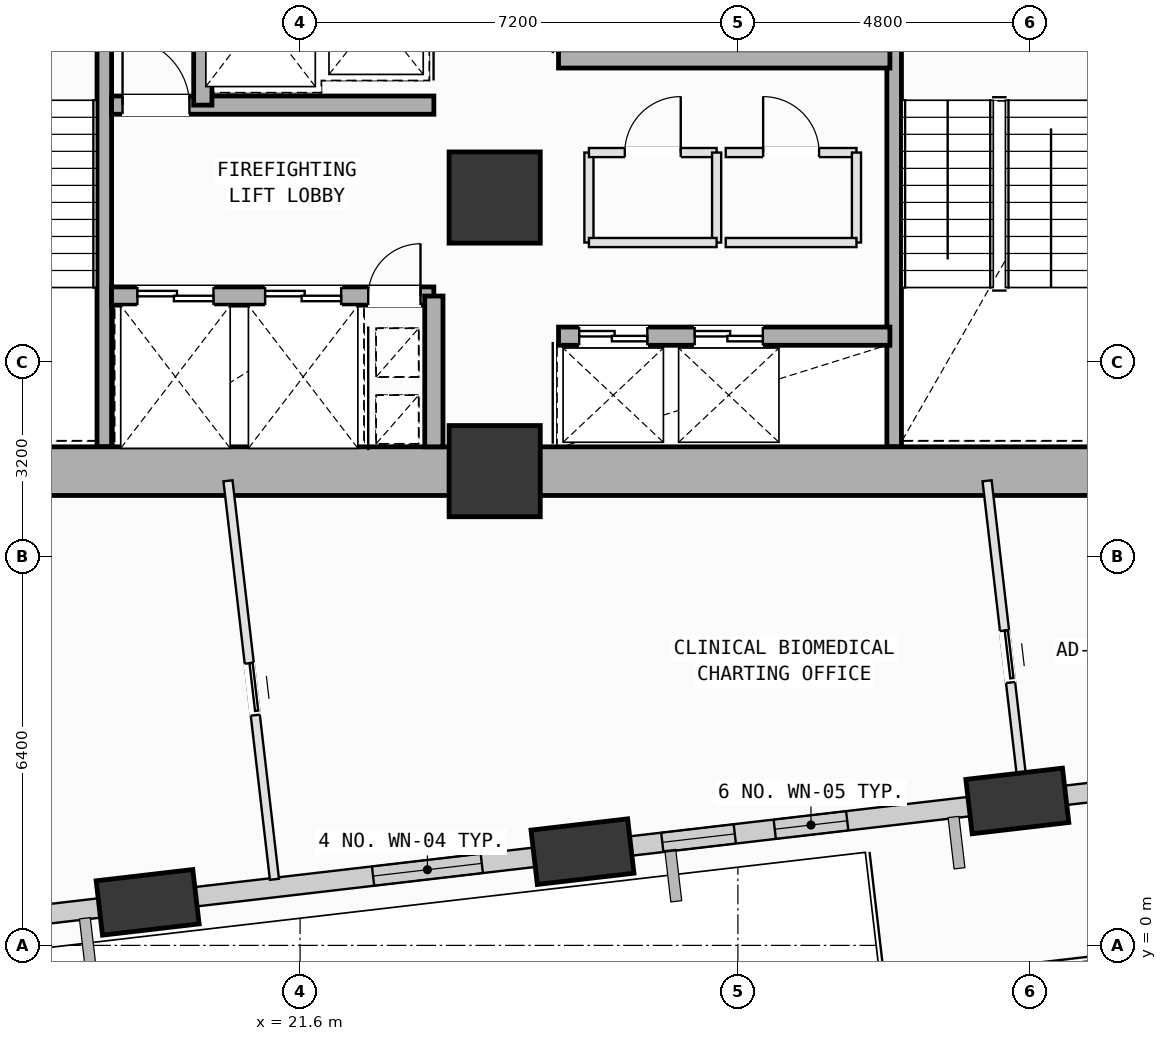
"""IFC4 building model, lengths in metres.
Left out: names, types, materials, properties, quantities, classifications, styles, units other than length and angle.
Written with IfcOpenShell. Run it as: python <this file> out.ifc"""

import sys

from ifc_helpers import new_model, si_unit, direction, frame, frame_2d, origin, origin_2d, place, context, subcontext, project, spatial, rectangle, extrude, element, fill, save


model = new_model("IFC4")
c1 = context("Model", 3, precision=1e-05, world=origin(), true_north=direction((0.0, 1.0)))
c2 = subcontext(c1, "Body", "Model", "MODEL_VIEW")
j1 = project(units=[si_unit("LENGTHUNIT", "METRE"), si_unit("PLANEANGLEUNIT", "RADIAN")], contexts=[c1])
p1 = place(None, origin())
s1 = spatial("IfcSite", under=j1, at=p1, CompositionType="ELEMENT")
p2 = place(p1, origin())
s2 = spatial("IfcBuilding", under=s1, at=p2, CompositionType="ELEMENT")
p3 = place(p2, frame((0.0, 0.0, 51.0)))
s3 = spatial("IfcBuildingStorey", under=s2, at=p3, CompositionType="ELEMENT", Elevation=51.0)
for number, where, z_axis, x_axis in (
    (1, (24.8, 7.8, 0.0), (0.0, 0.0, 1.0), (1.0, 0.0, 0.0)),
    (2, (24.8, 12.3, 0.0), (0.0, 0.0, 1.0), (1.0, 0.0, 0.0)),
):
    element("IfcColumn", number, at=place(p3, frame(where, z_axis=z_axis, x_axis=x_axis)), inside=s3, PredefinedType="COLUMN", context=c2, shape_type="SweptSolid", body=[
        extrude(rectangle(XDim=1.5, YDim=1.5, at=origin_2d()), origin(), (0.0, 0.0, 1.0), 4.0),
    ])
p4 = place(p3, frame((19.093, 0.708, 0.002), z_axis=(0.099691318182, -0.058916780252, 0.993272598074), x_axis=(0.406334815095, 0.913625847091, 0.013410054754)))
e3 = element("IfcColumn", 3, at=p4, inside=s3, PredefinedType="COLUMN", context=c2, shape_type="SweptSolid", body=[
    extrude(rectangle(XDim=1.6, YDim=0.9, at=origin_2d()), origin(), (0.0, 0.0, 1.0), 4.024),
])
p5 = place(p3, frame((26.244, 1.542, 0.002), z_axis=(0.096150082525, -0.029537888816, 0.994928477206), x_axis=(0.181548759309, 0.983312955757, 0.011648134348)))
e4 = element("IfcColumn", 4, at=p5, inside=s3, PredefinedType="COLUMN", context=c2, shape_type="SweptSolid", body=[
    extrude(rectangle(XDim=1.6, YDim=0.9, at=origin_2d()), origin(), (0.0, 0.0, 1.0), 4.017),
])
p6 = place(p3, frame((33.396, 2.375, 0.002), z_axis=(0.092515382804, -6.0825367e-05, 0.995711253449), x_axis=(-0.114654270311, 0.993347681302, 0.010713652585)))
e5 = element("IfcColumn", 5, at=p6, inside=s3, PredefinedType="COLUMN", context=c2, shape_type="SweptSolid", body=[
    extrude(rectangle(XDim=1.6, YDim=0.9, at=origin_2d()), origin(), (0.0, 0.0, 1.0), 4.014),
])
p7 = place(p3, frame((18.689, 0.661, 0.0), z_axis=(0.0, 0.0, 1.0), x_axis=(-0.99327376763, -0.115789561442, 0.0)))
e6 = element("IfcWall", 6, at=p7, inside=s3, PredefinedType="SOLIDWALL", context=c2, shape_type="SweptSolid", body=[
    extrude(rectangle(XDim=6.034, YDim=0.32, at=frame_2d((3.017, 0.0))), origin(), (0.0, 0.0, 1.0), 3.165),
])
p8 = place(p7, frame((2.313, 0.0, 0.75)))
e7 = element("IfcOpeningElement", 7, at=p8, cuts=e6, PredefinedType="OPENING", context=c2, shape_type="SweptSolid", body=[
    extrude(rectangle(XDim=1.4, YDim=1.85, at=frame_2d((0.7, 0.925))), frame((0.0, 0.17, 0.0), z_axis=(0.0, -1.0, 0.0), x_axis=(1.0, 0.0, 0.0)), (0.0, 0.0, 1.0), 0.34),
])
p9 = place(p3, frame((25.83, 1.493, 0.0), z_axis=(0.0, 0.0, 1.0), x_axis=(-0.993271324442, -0.115810517836, 0.0)))
e8 = element("IfcWall", 8, at=p9, inside=s3, PredefinedType="SOLIDWALL", context=c2, shape_type="SweptSolid", body=[
    extrude(rectangle(XDim=6.006, YDim=0.32, at=frame_2d((3.003, 0.0))), origin(), (0.0, 0.0, 1.0), 3.165),
])
p10 = place(p9, frame((1.25, 0.0, 0.75)))
e9 = element("IfcOpeningElement", 9, at=p10, cuts=e8, PredefinedType="OPENING", context=c2, shape_type="SweptSolid", body=[
    extrude(rectangle(XDim=1.8, YDim=2.05, at=frame_2d((0.9, 1.025))), frame((0.0, 0.17, 0.0), z_axis=(0.0, -1.0, 0.0), x_axis=(1.0, 0.0, 0.0)), (0.0, 0.0, 1.0), 0.34),
])
p11 = place(p3, frame((32.976, 2.326, 0.0), z_axis=(0.0, 0.0, 1.0), x_axis=(-0.99327275312, -0.115798263844, 0.0)))
e10 = element("IfcWall", 10, at=p11, inside=s3, PredefinedType="SOLIDWALL", context=c2, shape_type="SweptSolid", body=[
    extrude(rectangle(XDim=5.99, YDim=0.32, at=frame_2d((2.995, 0.0))), origin(), (0.0, 0.0, 1.0), 3.165),
])
p12 = place(p11, frame((2.394, 0.0, 0.75)))
e11 = element("IfcOpeningElement", 11, at=p12, cuts=e10, PredefinedType="OPENING", context=c2, shape_type="SweptSolid", body=[
    extrude(rectangle(XDim=1.2, YDim=1.75, at=frame_2d((0.6, 0.875))), frame((0.0, 0.17, 0.0), z_axis=(0.0, -1.0, 0.0), x_axis=(1.0, 0.0, 0.0)), (0.0, 0.0, 1.0), 0.34),
])
p13 = place(p11, frame((4.256, 0.0, 0.75)))
e12 = element("IfcOpeningElement", 12, at=p13, cuts=e10, PredefinedType="OPENING", context=c2, shape_type="SweptSolid", body=[
    extrude(rectangle(XDim=1.2, YDim=1.75, at=frame_2d((0.6, 0.875))), frame((0.0, 0.17, 0.0), z_axis=(0.0, -1.0, 0.0), x_axis=(1.0, 0.0, 0.0)), (0.0, 0.0, 1.0), 0.34),
])
p14 = place(p3, frame((38.599, 2.982, 0.0), z_axis=(0.0, 0.0, 1.0), x_axis=(-0.993273351727, -0.115793129113, 0.0)))
e13 = element("IfcWall", 13, at=p14, inside=s3, PredefinedType="SOLIDWALL", context=c2, shape_type="SweptSolid", body=[
    extrude(rectangle(XDim=4.447, YDim=0.32, at=frame_2d((2.223, 0.0))), origin(), (0.0, 0.0, 1.0), 3.165),
])
p15 = place(p14, frame((1.348, 0.0, 0.75)))
e14 = element("IfcOpeningElement", 14, at=p15, cuts=e13, PredefinedType="OPENING", context=c2, shape_type="SweptSolid", body=[
    extrude(rectangle(XDim=1.6, YDim=1.95, at=frame_2d((0.8, 0.975))), frame((0.0, 0.17, 0.0), z_axis=(0.0, -1.0, 0.0), x_axis=(1.0, 0.0, 0.0)), (0.0, 0.0, 1.0), 0.34),
])
for number, where, z_axis, x_axis in (
    (15, (18.38, 15.12, 0.0), (0.0, 0.0, 1.0), (0.0, -1.0, 0.0)),
    (16, (31.37, 8.2, 0.0), (0.0, 0.0, 1.0), (0.0, 1.0, 0.0)),
):
    element("IfcWall", number, at=place(p3, frame(where, z_axis=z_axis, x_axis=x_axis)), inside=s3, PredefinedType="SOLIDWALL", context=c2, shape_type="SweptSolid", body=[
        extrude(rectangle(XDim=6.92, YDim=0.24, at=frame_2d((3.46, 0.0))), origin(), (0.0, 0.0, 1.0), 3.78),
    ])
for number, where, z_axis, x_axis in (
    (17, (14.0, 7.8, 0.0), (0.0, 0.0, 1.0), (1.0, 0.0, 0.0)),
    (18, (24.8, 7.8, 0.0), (0.0, 0.0, 1.0), (1.0, 0.0, 0.0)),
):
    element("IfcWall", number, at=place(p3, frame(where, z_axis=z_axis, x_axis=x_axis)), inside=s3, PredefinedType="SHEAR", context=c2, shape_type="SweptSolid", body=[
        extrude(rectangle(XDim=10.8, YDim=0.8, at=frame_2d((5.4, 0.0))), origin(), (0.0, 0.0, 1.0), 3.78),
    ])
p16 = place(p3, frame((18.5, 10.68, 0.0), z_axis=(0.0, 0.0, 1.0), x_axis=(1.0, 0.0, 0.0)))
e19 = element("IfcWall", 19, at=p16, inside=s3, PredefinedType="SOLIDWALL", context=c2, shape_type="SweptSolid", body=[
    extrude(rectangle(XDim=5.3, YDim=0.3, at=frame_2d((2.65, 0.0))), origin(), (0.0, 0.0, 1.0), 3.78),
])
p17 = place(p16, frame((4.22, 0.0, 0.0)))
e20 = element("IfcOpeningElement", 20, at=p17, cuts=e19, PredefinedType="OPENING", context=c2, shape_type="SweptSolid", body=[
    extrude(rectangle(XDim=0.86, YDim=2.06, at=frame_2d((0.43, 1.03))), frame((0.0, 0.16, 0.0), z_axis=(0.0, -1.0, 0.0), x_axis=(1.0, 0.0, 0.0)), (0.0, 0.0, 1.0), 0.32),
])
p18 = place(p16, frame((0.425, 0.0, 0.0)))
e21 = element("IfcOpeningElement", 21, at=p18, cuts=e19, PredefinedType="OPENING", context=c2, shape_type="SweptSolid", body=[
    extrude(rectangle(XDim=1.25, YDim=2.18, at=frame_2d((0.625, 1.09))), frame((0.0, 0.16, 0.0), z_axis=(0.0, -1.0, 0.0), x_axis=(1.0, 0.0, 0.0)), (0.0, 0.0, 1.0), 0.32),
])
p19 = place(p16, frame((2.525, 0.0, 0.0)))
e22 = element("IfcOpeningElement", 22, at=p19, cuts=e19, PredefinedType="OPENING", context=c2, shape_type="SweptSolid", body=[
    extrude(rectangle(XDim=1.25, YDim=2.18, at=frame_2d((0.625, 1.09))), frame((0.0, 0.16, 0.0), z_axis=(0.0, -1.0, 0.0), x_axis=(1.0, 0.0, 0.0)), (0.0, 0.0, 1.0), 0.32),
])
p20 = place(p3, frame((18.5, 13.82, 0.0), z_axis=(0.0, 0.0, 1.0), x_axis=(1.0, 0.0, 0.0)))
e23 = element("IfcWall", 23, at=p20, inside=s3, PredefinedType="SOLIDWALL", context=c2, shape_type="SweptSolid", body=[
    extrude(rectangle(XDim=5.3, YDim=0.3, at=frame_2d((2.65, 0.0))), origin(), (0.0, 0.0, 1.0), 3.78),
])
p21 = place(p20, frame((0.18, 0.0, 0.0)))
e24 = element("IfcOpeningElement", 24, at=p21, cuts=e23, PredefinedType="OPENING", context=c2, shape_type="SweptSolid", body=[
    extrude(rectangle(XDim=1.1, YDim=2.15, at=frame_2d((0.55, 1.075))), frame((0.0, 0.16, 0.0), z_axis=(0.0, -1.0, 0.0), x_axis=(1.0, 0.0, 0.0)), (0.0, 0.0, 1.0), 0.32),
])
p22 = place(p3, frame((23.8, 8.2, 0.0), z_axis=(0.0, 0.0, 1.0), x_axis=(0.0, 1.0, 0.0)))
e25 = element("IfcWall", 25, at=p22, inside=s3, PredefinedType="SOLIDWALL", context=c2, shape_type="SweptSolid", body=[
    extrude(rectangle(XDim=2.48, YDim=0.3, at=frame_2d((1.24, 0.0))), origin(), (0.0, 0.0, 1.0), 3.78),
])
p23 = place(p3, frame((20.0, 13.82, 0.0), z_axis=(0.0, 0.0, 1.0), x_axis=(0.0, 1.0, 0.0)))
e26 = element("IfcWall", 26, at=p23, inside=s3, PredefinedType="SOLIDWALL", context=c2, shape_type="SweptSolid", body=[
    extrude(rectangle(XDim=2.73, YDim=0.3, at=frame_2d((1.365, 0.0))), origin(), (0.0, 0.0, 1.0), 3.78),
])
p24 = place(p3, frame((25.85, 10.02, 0.0), z_axis=(0.0, 0.0, 1.0), x_axis=(1.0, 0.0, 0.0)))
e27 = element("IfcWall", 27, at=p24, inside=s3, PredefinedType="SOLIDWALL", context=c2, shape_type="SweptSolid", body=[
    extrude(rectangle(XDim=5.45, YDim=0.3, at=frame_2d((2.725, 0.0))), origin(), (0.0, 0.0, 1.0), 3.78),
])
p25 = place(p24, frame((0.34, 0.0, 0.0)))
e28 = element("IfcOpeningElement", 28, at=p25, cuts=e27, PredefinedType="OPENING", context=c2, shape_type="SweptSolid", body=[
    extrude(rectangle(XDim=1.12, YDim=2.15, at=frame_2d((0.56, 1.075))), frame((0.0, 0.16, 0.0), z_axis=(0.0, -1.0, 0.0), x_axis=(1.0, 0.0, 0.0)), (0.0, 0.0, 1.0), 0.32),
])
p26 = place(p24, frame((2.24, 0.0, 0.0)))
e29 = element("IfcOpeningElement", 29, at=p26, cuts=e27, PredefinedType="OPENING", context=c2, shape_type="SweptSolid", body=[
    extrude(rectangle(XDim=1.12, YDim=2.15, at=frame_2d((0.56, 1.075))), frame((0.0, 0.16, 0.0), z_axis=(0.0, -1.0, 0.0), x_axis=(1.0, 0.0, 0.0)), (0.0, 0.0, 1.0), 0.32),
])
p27 = place(p3, frame((25.85, 14.58, 0.0), z_axis=(0.0, 0.0, 1.0), x_axis=(1.0, 0.0, 0.0)))
e30 = element("IfcWall", 30, at=p27, inside=s3, PredefinedType="SOLIDWALL", context=c2, shape_type="SweptSolid", body=[
    extrude(rectangle(XDim=5.45, YDim=0.3, at=frame_2d((2.725, 0.0))), origin(), (0.0, 0.0, 1.0), 3.78),
])
p28 = place(p3, frame((26.35, 11.56, 0.0), z_axis=(0.0, 0.0, 1.0), x_axis=(0.0, 1.0, 0.0)))
e31 = element("IfcWall", 31, at=p28, inside=s3, PredefinedType="PARTITIONING", context=c2, shape_type="SweptSolid", body=[
    extrude(rectangle(XDim=1.48, YDim=0.15, at=frame_2d((0.74, 0.0))), origin(), (0.0, 0.0, 1.0), 3.78),
])
p29 = place(p3, frame((26.35, 13.04, 0.0), z_axis=(0.0, 0.0, 1.0), x_axis=(1.0, 0.0, 0.0)))
e32 = element("IfcWall", 32, at=p29, inside=s3, PredefinedType="PARTITIONING", context=c2, shape_type="SweptSolid", body=[
    extrude(rectangle(XDim=2.1, YDim=0.15, at=frame_2d((1.05, 0.0))), origin(), (0.0, 0.0, 1.0), 3.78),
])
p30 = place(p29, frame((0.59, 0.0, 0.0)))
e33 = element("IfcOpeningElement", 33, at=p30, cuts=e32, PredefinedType="OPENING", context=c2, shape_type="SweptSolid", body=[
    extrude(rectangle(XDim=0.92, YDim=2.1, at=frame_2d((0.46, 1.05))), frame((0.0, 0.085, 0.0), z_axis=(0.0, -1.0, 0.0), x_axis=(1.0, 0.0, 0.0)), (0.0, 0.0, 1.0), 0.17),
])
p31 = place(p3, frame((28.45, 13.04, 0.0), z_axis=(0.0, 0.0, 1.0), x_axis=(0.0, -1.0, 0.0)))
e34 = element("IfcWall", 34, at=p31, inside=s3, PredefinedType="PARTITIONING", context=c2, shape_type="SweptSolid", body=[
    extrude(rectangle(XDim=1.48, YDim=0.15, at=frame_2d((0.74, 0.0))), origin(), (0.0, 0.0, 1.0), 3.78),
])
p32 = place(p3, frame((28.45, 11.56, 0.0), z_axis=(0.0, 0.0, 1.0), x_axis=(-1.0, 0.0, 0.0)))
e35 = element("IfcWall", 35, at=p32, inside=s3, PredefinedType="PARTITIONING", context=c2, shape_type="SweptSolid", body=[
    extrude(rectangle(XDim=2.1, YDim=0.15, at=frame_2d((1.05, 0.0))), origin(), (0.0, 0.0, 1.0), 3.78),
])
p33 = place(p3, frame((28.6, 13.04, 0.0), z_axis=(0.0, 0.0, 1.0), x_axis=(1.0, 0.0, 0.0)))
e36 = element("IfcWall", 36, at=p33, inside=s3, PredefinedType="PARTITIONING", context=c2, shape_type="SweptSolid", body=[
    extrude(rectangle(XDim=2.15, YDim=0.15, at=frame_2d((1.075, 0.0))), origin(), (0.0, 0.0, 1.0), 3.78),
])
p34 = place(p33, frame((0.615, 0.0, 0.0)))
e37 = element("IfcOpeningElement", 37, at=p34, cuts=e36, PredefinedType="OPENING", context=c2, shape_type="SweptSolid", body=[
    extrude(rectangle(XDim=0.92, YDim=2.1, at=frame_2d((0.46, 1.05))), frame((0.0, 0.085, 0.0), z_axis=(0.0, -1.0, 0.0), x_axis=(1.0, 0.0, 0.0)), (0.0, 0.0, 1.0), 0.17),
])
p35 = place(p3, frame((30.75, 13.04, 0.0), z_axis=(0.0, 0.0, 1.0), x_axis=(0.0, -1.0, 0.0)))
e38 = element("IfcWall", 38, at=p35, inside=s3, PredefinedType="PARTITIONING", context=c2, shape_type="SweptSolid", body=[
    extrude(rectangle(XDim=1.48, YDim=0.15, at=frame_2d((0.74, 0.0))), origin(), (0.0, 0.0, 1.0), 3.78),
])
p36 = place(p3, frame((30.75, 11.56, 0.0), z_axis=(0.0, 0.0, 1.0), x_axis=(-1.0, 0.0, 0.0)))
e39 = element("IfcWall", 39, at=p36, inside=s3, PredefinedType="PARTITIONING", context=c2, shape_type="SweptSolid", body=[
    extrude(rectangle(XDim=2.15, YDim=0.15, at=frame_2d((1.075, 0.0))), origin(), (0.0, 0.0, 1.0), 3.78),
])
p37 = place(p3, frame((20.414, 7.641, 0.0), z_axis=(0.0, 0.0, 1.0), x_axis=(0.115769975506, -0.993276050638, 0.0)))
e40 = element("IfcWall", 40, at=p37, inside=s3, PredefinedType="PARTITIONING", context=c2, shape_type="SweptSolid", body=[
    extrude(rectangle(XDim=6.599, YDim=0.15, at=frame_2d((3.299, 0.0))), origin(), (0.0, 0.0, 1.0), 3.78),
])
p38 = place(p37, frame((3.02, 0.0, 0.0)))
e41 = element("IfcOpeningElement", 41, at=p38, cuts=e40, PredefinedType="OPENING", context=c2, shape_type="SweptSolid", body=[
    extrude(rectangle(XDim=0.86, YDim=2.06, at=frame_2d((0.43, 1.03))), frame((0.0, 0.085, 0.0), z_axis=(0.0, -1.0, 0.0), x_axis=(1.0, 0.0, 0.0)), (0.0, 0.0, 1.0), 0.17),
])
p39 = place(p3, frame((19.891, 0.569, 0.0), z_axis=(0.0, 0.0, 1.0), x_axis=(-0.993251653586, -0.115979104366, 0.0)))
e42 = element("IfcWall", 42, at=p39, inside=s3, PredefinedType="PARTITIONING", context=c2, shape_type="SweptSolid", body=[
    extrude(rectangle(XDim=1.183, YDim=0.15, at=frame_2d((0.592, 0.0))), origin(), (0.0, 0.0, 1.0), 3.165),
])
p40 = place(p3, frame((33.536, 2.16, 0.0), z_axis=(0.0, 0.0, 1.0), x_axis=(-0.993323124869, -0.115365374356, 0.0)))
e43 = element("IfcWall", 43, at=p40, inside=s3, PredefinedType="PARTITIONING", context=c2, shape_type="SweptSolid", body=[
    extrude(rectangle(XDim=0.538, YDim=0.15, at=frame_2d((0.269, 0.0))), origin(), (0.0, 0.0, 1.0), 3.165),
])
p41 = place(p3, frame((27.053, 1.404, 0.0), z_axis=(0.0, 0.0, 1.0), x_axis=(-0.993310082702, -0.115477615162, 0.0)))
e44 = element("IfcWall", 44, at=p41, inside=s3, PredefinedType="PARTITIONING", context=c2, shape_type="SweptSolid", body=[
    extrude(rectangle(XDim=1.205, YDim=0.15, at=frame_2d((0.603, 0.0))), origin(), (0.0, 0.0, 1.0), 3.165),
])
p42 = place(p3, frame((32.898, 7.641, 0.0), z_axis=(0.0, 0.0, 1.0), x_axis=(0.115606435858, -0.99329509814, 0.0)))
e45 = element("IfcWall", 45, at=p42, inside=s3, PredefinedType="PARTITIONING", context=c2, shape_type="SweptSolid", body=[
    extrude(rectangle(XDim=5.518, YDim=0.15, at=frame_2d((2.759, 0.0))), origin(), (0.0, 0.0, 1.0), 3.78),
])
p43 = place(p42, frame((2.48, 0.0, 0.0)))
e46 = element("IfcOpeningElement", 46, at=p43, cuts=e45, PredefinedType="OPENING", context=c2, shape_type="SweptSolid", body=[
    extrude(rectangle(XDim=0.86, YDim=2.06, at=frame_2d((0.43, 1.03))), frame((0.0, 0.085, 0.0), z_axis=(0.0, -1.0, 0.0), x_axis=(1.0, 0.0, 0.0)), (0.0, 0.0, 1.0), 0.17),
])
p44 = place(p3, frame((34.209, 2.239, 0.0), z_axis=(0.0, 0.0, 1.0), x_axis=(-0.993240491089, -0.116074660716, 0.0)))
e47 = element("IfcWall", 47, at=p44, inside=s3, PredefinedType="PARTITIONING", context=c2, shape_type="SweptSolid", body=[
    extrude(rectangle(XDim=0.517, YDim=0.15, at=frame_2d((0.259, 0.0))), origin(), (0.0, 0.0, 1.0), 3.165),
])
p45 = place(p10, origin())
e48 = element("IfcWindow", 48, at=p45, inside=s3, PartitioningType="SINGLE_PANEL", PredefinedType="WINDOW", context=c2, shape_type="SweptSolid", body=[
    extrude(rectangle(XDim=1.8, YDim=2.05, at=frame_2d((0.9, 1.025))), frame((0.0, 0.03, 0.0), z_axis=(0.0, -1.0, 0.0), x_axis=(1.0, 0.0, 0.0)), (0.0, 0.0, 1.0), 0.06),
])
fill(e9, e48)
p46 = place(p12, origin())
e49 = element("IfcWindow", 49, at=p46, inside=s3, PartitioningType="SINGLE_PANEL", PredefinedType="WINDOW", context=c2, shape_type="SweptSolid", body=[
    extrude(rectangle(XDim=1.2, YDim=1.75, at=frame_2d((0.6, 0.875))), frame((0.0, 0.03, 0.0), z_axis=(0.0, -1.0, 0.0), x_axis=(1.0, 0.0, 0.0)), (0.0, 0.0, 1.0), 0.06),
])
fill(e11, e49)
p47 = place(p13, origin())
e50 = element("IfcWindow", 50, at=p47, inside=s3, PartitioningType="SINGLE_PANEL", PredefinedType="WINDOW", context=c2, shape_type="SweptSolid", body=[
    extrude(rectangle(XDim=1.2, YDim=1.75, at=frame_2d((0.6, 0.875))), frame((0.0, 0.03, 0.0), z_axis=(0.0, -1.0, 0.0), x_axis=(1.0, 0.0, 0.0)), (0.0, 0.0, 1.0), 0.06),
])
fill(e12, e50)
p48 = place(p17, origin())
e51 = element("IfcDoor", 51, at=p48, inside=s3, OperationType="SINGLE_SWING_RIGHT", PredefinedType="DOOR", context=c2, shape_type="SweptSolid", body=[
    extrude(rectangle(XDim=0.86, YDim=2.06, at=frame_2d((0.43, 1.03))), frame((0.0, 0.025, 0.0), z_axis=(0.0, -1.0, 0.0), x_axis=(1.0, 0.0, 0.0)), (0.0, 0.0, 1.0), 0.05),
])
fill(e20, e51)
p49 = place(p21, origin())
e52 = element("IfcDoor", 52, at=p49, inside=s3, OperationType="SINGLE_SWING_LEFT", PredefinedType="DOOR", context=c2, shape_type="SweptSolid", body=[
    extrude(rectangle(XDim=1.1, YDim=2.15, at=frame_2d((0.55, 1.075))), frame((0.0, 0.025, 0.0), z_axis=(0.0, -1.0, 0.0), x_axis=(1.0, 0.0, 0.0)), (0.0, 0.0, 1.0), 0.05),
])
fill(e24, e52)
p50 = place(p18, origin())
e53 = element("IfcDoor", 53, at=p50, inside=s3, OperationType="DOUBLE_DOOR_SLIDING", PredefinedType="DOOR", context=c2, shape_type="SweptSolid", body=[
    extrude(rectangle(XDim=1.25, YDim=2.18, at=frame_2d((0.625, 1.09))), frame((0.0, 0.025, 0.0), z_axis=(0.0, -1.0, 0.0), x_axis=(1.0, 0.0, 0.0)), (0.0, 0.0, 1.0), 0.05),
])
fill(e21, e53)
p51 = place(p19, origin())
e54 = element("IfcDoor", 54, at=p51, inside=s3, OperationType="DOUBLE_DOOR_SLIDING", PredefinedType="DOOR", context=c2, shape_type="SweptSolid", body=[
    extrude(rectangle(XDim=1.25, YDim=2.18, at=frame_2d((0.625, 1.09))), frame((0.0, 0.025, 0.0), z_axis=(0.0, -1.0, 0.0), x_axis=(1.0, 0.0, 0.0)), (0.0, 0.0, 1.0), 0.05),
])
fill(e22, e54)
p52 = place(p25, origin())
e55 = element("IfcDoor", 55, at=p52, inside=s3, OperationType="DOUBLE_DOOR_SLIDING", PredefinedType="DOOR", context=c2, shape_type="SweptSolid", body=[
    extrude(rectangle(XDim=1.12, YDim=2.15, at=frame_2d((0.56, 1.075))), frame((0.0, 0.025, 0.0), z_axis=(0.0, -1.0, 0.0), x_axis=(1.0, 0.0, 0.0)), (0.0, 0.0, 1.0), 0.05),
])
fill(e28, e55)
p53 = place(p26, origin())
e56 = element("IfcDoor", 56, at=p53, inside=s3, OperationType="DOUBLE_DOOR_SLIDING", PredefinedType="DOOR", context=c2, shape_type="SweptSolid", body=[
    extrude(rectangle(XDim=1.12, YDim=2.15, at=frame_2d((0.56, 1.075))), frame((0.0, 0.025, 0.0), z_axis=(0.0, -1.0, 0.0), x_axis=(1.0, 0.0, 0.0)), (0.0, 0.0, 1.0), 0.05),
])
fill(e29, e56)
p54 = place(p30, origin())
e57 = element("IfcDoor", 57, at=p54, inside=s3, OperationType="SINGLE_SWING_RIGHT", PredefinedType="DOOR", context=c2, shape_type="SweptSolid", body=[
    extrude(rectangle(XDim=0.92, YDim=2.1, at=frame_2d((0.46, 1.05))), frame((0.0, 0.025, 0.0), z_axis=(0.0, -1.0, 0.0), x_axis=(1.0, 0.0, 0.0)), (0.0, 0.0, 1.0), 0.05),
])
fill(e33, e57)
p55 = place(p34, origin())
e58 = element("IfcDoor", 58, at=p55, inside=s3, OperationType="SINGLE_SWING_LEFT", PredefinedType="DOOR", context=c2, shape_type="SweptSolid", body=[
    extrude(rectangle(XDim=0.92, YDim=2.1, at=frame_2d((0.46, 1.05))), frame((0.0, 0.025, 0.0), z_axis=(0.0, -1.0, 0.0), x_axis=(1.0, 0.0, 0.0)), (0.0, 0.0, 1.0), 0.05),
])
fill(e37, e58)
p56 = place(p43, origin())
e59 = element("IfcDoor", 59, at=p56, inside=s3, OperationType="SLIDING_TO_LEFT", PredefinedType="DOOR", context=c2, shape_type="SweptSolid", body=[
    extrude(rectangle(XDim=0.86, YDim=2.06, at=frame_2d((0.43, 1.03))), frame((0.0, 0.025, 0.0), z_axis=(0.0, -1.0, 0.0), x_axis=(1.0, 0.0, 0.0)), (0.0, 0.0, 1.0), 0.05),
])
fill(e46, e59)
p57 = place(p38, origin())
e60 = element("IfcDoor", 60, at=p57, inside=s3, OperationType="SLIDING_TO_LEFT", PredefinedType="DOOR", context=c2, shape_type="SweptSolid", body=[
    extrude(rectangle(XDim=0.86, YDim=2.06, at=frame_2d((0.43, 1.03))), frame((0.0, 0.025, 0.0), z_axis=(0.0, -1.0, 0.0), x_axis=(1.0, 0.0, 0.0)), (0.0, 0.0, 1.0), 0.05),
])
fill(e41, e60)
save(model, sys.argv[1])
